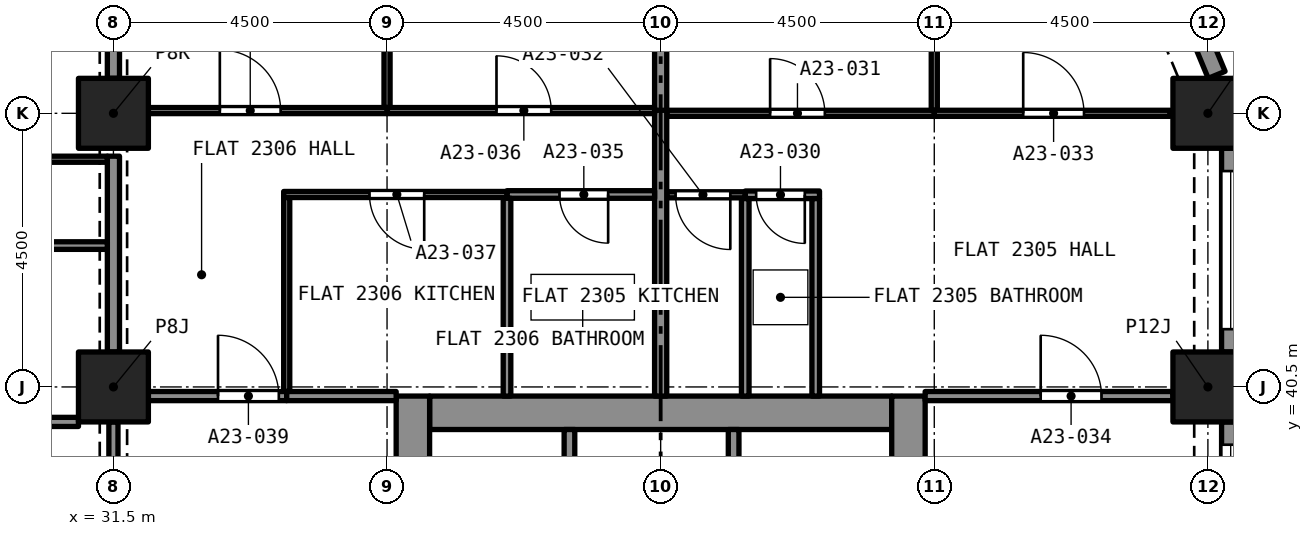
"""IFC4 building model, lengths in metres.
Left out: names, types, materials, properties, quantities, classifications, styles, units other than length and angle.
Written with IfcOpenShell. Run it as: python <this file> out.ifc"""

import sys

from ifc_helpers import new_model, si_unit, direction, frame, frame_2d, origin, origin_2d, place, context, subcontext, project, spatial, rectangle, extrude, element, fill, save


model = new_model("IFC4")
c1 = context("Model", 3, precision=1e-05, world=origin(), true_north=direction((0.0, 1.0)))
c2 = subcontext(c1, "Body", "Model", "MODEL_VIEW")
j1 = project(units=[si_unit("LENGTHUNIT", "METRE"), si_unit("PLANEANGLEUNIT", "RADIAN")], contexts=[c1])
p1 = place(None, origin())
s1 = spatial("IfcSite", under=j1, at=p1, CompositionType="ELEMENT")
p2 = place(p1, origin())
s2 = spatial("IfcBuilding", under=s1, at=p2, CompositionType="ELEMENT")
p3 = place(p2, frame((0.0, 0.0, 86.4)))
s3 = spatial("IfcBuildingStorey", under=s2, at=p3, CompositionType="ELEMENT", Elevation=86.4)
for number, where, z_axis, x_axis in (
    (1, (31.5, 40.5, 0.0), (0.0, 0.0, 1.0), (1.0, 0.0, 0.0)),
    (2, (49.5, 40.5, 0.0), (0.0, 0.0, 1.0), (1.0, 0.0, 0.0)),
    (3, (31.5, 45.0, 0.0), (0.0, 0.0, 1.0), (1.0, 0.0, 0.0)),
    (4, (49.5, 45.0, 0.0), (0.0, 0.0, 1.0), (1.0, 0.0, 0.0)),
):
    element("IfcColumn", number, at=place(p3, frame(where, z_axis=z_axis, x_axis=x_axis)), inside=s3, PredefinedType="COLUMN", context=c2, shape_type="SweptSolid", body=[
        extrude(rectangle(XDim=1.15, YDim=1.15, at=origin_2d()), origin(), (0.0, 0.0, 1.0), 3.2),
    ])
p4 = place(p3, frame((36.7, 40.075, 0.0), z_axis=(0.0, 0.0, 1.0), x_axis=(1.0, 0.0, 0.0)))
e5 = element("IfcWall", 5, at=p4, inside=s3, PredefinedType="SOLIDWALL", context=c2, shape_type="SweptSolid", body=[
    extrude(rectangle(XDim=7.6, YDim=0.55, at=frame_2d((3.8, 0.0))), origin(), (0.0, 0.0, 1.0), 3.2),
])
p5 = place(p3, frame((36.425, 27.15, 0.0), z_axis=(0.0, 0.0, 1.0), x_axis=(0.0, 1.0, 0.0)))
e6 = element("IfcWall", 6, at=p5, inside=s3, PredefinedType="SOLIDWALL", context=c2, shape_type="SweptSolid", body=[
    extrude(rectangle(XDim=13.2, YDim=0.55, at=frame_2d((6.6, 0.0))), origin(), (0.0, 0.0, 1.0), 3.2),
])
p6 = place(p5, frame((8.8, 0.0, 0.0)))
e7 = element("IfcOpeningElement", 7, at=p6, cuts=e6, PredefinedType="OPENING", context=c2, shape_type="SweptSolid", body=[
    extrude(rectangle(XDim=1.2, YDim=2.1, at=frame_2d((0.6, 1.05))), frame((0.0, 0.285, 0.0), z_axis=(0.0, -1.0, 0.0), x_axis=(1.0, 0.0, 0.0)), (0.0, 0.0, 1.0), 0.57),
])
p7 = place(p3, frame((44.575, 27.15, 0.0), z_axis=(0.0, 0.0, 1.0), x_axis=(0.0, 1.0, 0.0)))
e8 = element("IfcWall", 8, at=p7, inside=s3, PredefinedType="SOLIDWALL", context=c2, shape_type="SweptSolid", body=[
    extrude(rectangle(XDim=13.2, YDim=0.55, at=frame_2d((6.6, 0.0))), origin(), (0.0, 0.0, 1.0), 3.2),
])
p8 = place(p7, frame((8.8, 0.0, 0.0)))
e9 = element("IfcOpeningElement", 9, at=p8, cuts=e8, PredefinedType="OPENING", context=c2, shape_type="SweptSolid", body=[
    extrude(rectangle(XDim=1.2, YDim=2.1, at=frame_2d((0.6, 1.05))), frame((0.0, 0.285, 0.0), z_axis=(0.0, -1.0, 0.0), x_axis=(1.0, 0.0, 0.0)), (0.0, 0.0, 1.0), 0.57),
])
p9 = place(p3, frame((49.875, 39.925, 0.0), z_axis=(0.0, 0.0, 1.0), x_axis=(0.0, -1.0, 0.0)))
e10 = element("IfcWall", 10, at=p9, inside=s3, PredefinedType="SOLIDWALL", context=c2, shape_type="SweptSolid", body=[
    extrude(rectangle(XDim=3.35, YDim=0.3, at=frame_2d((1.675, 0.0))), origin(), (0.0, 0.0, 1.0), 3.2),
])
p10 = place(p9, frame((0.375, 0.0, 0.45)))
e11 = element("IfcOpeningElement", 11, at=p10, cuts=e10, PredefinedType="OPENING", context=c2, shape_type="SweptSolid", body=[
    extrude(rectangle(XDim=2.6, YDim=1.95, at=frame_2d((1.3, 0.975))), frame((0.0, 0.16, 0.0), z_axis=(0.0, -1.0, 0.0), x_axis=(1.0, 0.0, 0.0)), (0.0, 0.0, 1.0), 0.32),
])
p11 = place(p3, frame((49.875, 44.425, 0.0), z_axis=(0.0, 0.0, 1.0), x_axis=(0.0, -1.0, 0.0)))
e12 = element("IfcWall", 12, at=p11, inside=s3, PredefinedType="SOLIDWALL", context=c2, shape_type="SweptSolid", body=[
    extrude(rectangle(XDim=3.35, YDim=0.3, at=frame_2d((1.675, 0.0))), origin(), (0.0, 0.0, 1.0), 3.2),
])
p12 = place(p11, frame((0.375, 0.0, 0.45)))
e13 = element("IfcOpeningElement", 13, at=p12, cuts=e12, PredefinedType="OPENING", context=c2, shape_type="SweptSolid", body=[
    extrude(rectangle(XDim=2.6, YDim=1.95, at=frame_2d((1.3, 0.975))), frame((0.0, 0.16, 0.0), z_axis=(0.0, -1.0, 0.0), x_axis=(1.0, 0.0, 0.0)), (0.0, 0.0, 1.0), 0.32),
])
p13 = place(p3, frame((48.816, 47.631, 0.0), z_axis=(0.0, 0.0, 1.0), x_axis=(0.382723818695, -0.923862802911, 0.0)))
e14 = element("IfcWall", 14, at=p13, inside=s3, PredefinedType="SOLIDWALL", context=c2, shape_type="SweptSolid", body=[
    extrude(rectangle(XDim=2.164, YDim=0.3, at=frame_2d((1.082, 0.0))), origin(), (0.0, 0.0, 1.0), 3.2),
])
p14 = place(p13, frame((0.271, 0.0, 0.45)))
e15 = element("IfcOpeningElement", 15, at=p14, cuts=e14, PredefinedType="OPENING", context=c2, shape_type="SweptSolid", body=[
    extrude(rectangle(XDim=1.4, YDim=1.95, at=frame_2d((0.7, 0.975))), frame((0.0, 0.16, 0.0), z_axis=(0.0, -1.0, 0.0), x_axis=(1.0, 0.0, 0.0)), (0.0, 0.0, 1.0), 0.32),
])
p15 = place(p3, frame((43.113, 43.66, 0.0), z_axis=(0.0, 0.0, 1.0), x_axis=(-1.0, 0.0, 0.0)))
e16 = element("IfcWall", 16, at=p15, inside=s3, PredefinedType="PARTITIONING", context=c2, shape_type="SweptSolid", body=[
    extrude(rectangle(XDim=1.222, YDim=0.125, at=frame_2d((0.611, 0.0))), origin(), (0.0, 0.0, 1.0), 2.9),
])
p16 = place(p15, frame((0.242, 0.0, 0.0)))
e17 = element("IfcOpeningElement", 17, at=p16, cuts=e16, PredefinedType="OPENING", context=c2, shape_type="SweptSolid", body=[
    extrude(rectangle(XDim=0.8, YDim=2.1, at=frame_2d((0.4, 1.05))), frame((0.0, 0.073, 0.0), z_axis=(0.0, -1.0, 0.0), x_axis=(1.0, 0.0, 0.0)), (0.0, 0.0, 1.0), 0.145),
])
for number, where, z_axis, x_axis in (
    (18, (43.05, 40.35, 0.0), (0.0, 0.0, 1.0), (0.0, 1.0, 0.0)),
    (19, (41.891, 40.35, 0.0), (0.0, 0.0, 1.0), (0.0, 1.0, 0.0)),
):
    element("IfcWall", number, at=place(p3, frame(where, z_axis=z_axis, x_axis=x_axis)), inside=s3, PredefinedType="PARTITIONING", context=c2, shape_type="SweptSolid", body=[
        extrude(rectangle(XDim=3.247, YDim=0.125, at=frame_2d((1.624, 0.0))), origin(), (0.0, 0.0, 1.0), 2.9),
    ])
p17 = place(p3, frame((40.6, 45.0, 0.0), z_axis=(0.0, 0.0, 1.0), x_axis=(1.0, 0.0, 0.0)))
e20 = element("IfcWall", 20, at=p17, inside=s3, PredefinedType="PARTITIONING", context=c2, shape_type="SweptSolid", body=[
    extrude(rectangle(XDim=4.4, YDim=0.1, at=frame_2d((2.2, 0.0))), origin(), (0.0, 0.0, 1.0), 2.9),
])
p18 = place(p17, frame((1.7, 0.0, 0.0)))
e21 = element("IfcOpeningElement", 21, at=p18, cuts=e20, PredefinedType="OPENING", context=c2, shape_type="SweptSolid", body=[
    extrude(rectangle(XDim=0.9, YDim=2.1, at=frame_2d((0.45, 1.05))), frame((0.0, 0.06, 0.0), z_axis=(0.0, -1.0, 0.0), x_axis=(1.0, 0.0, 0.0)), (0.0, 0.0, 1.0), 0.12),
])
p19 = place(p3, frame((45.0, 45.05, 0.0), z_axis=(0.0, 0.0, 1.0), x_axis=(0.0, 1.0, 0.0)))
e22 = element("IfcWall", 22, at=p19, inside=s3, PredefinedType="PARTITIONING", context=c2, shape_type="SweptSolid", body=[
    extrude(rectangle(XDim=3.828, YDim=0.1, at=frame_2d((1.914, 0.0))), origin(), (0.0, 0.0, 1.0), 2.9),
])
p20 = place(p3, frame((40.5, 44.995, 0.0), z_axis=(0.0, 0.0, 1.0), x_axis=(0.0, 1.0, 0.0)))
e23 = element("IfcWall", 23, at=p20, inside=s3, PredefinedType="PARTITIONING", context=c2, shape_type="SweptSolid", body=[
    extrude(rectangle(XDim=3.93, YDim=0.2, at=frame_2d((1.965, 0.0))), origin(), (0.0, 0.0, 1.0), 2.9),
])
p21 = place(p3, frame((41.891, 43.66, 0.0), z_axis=(0.0, 0.0, 1.0), x_axis=(-1.0, 0.0, 0.0)))
e24 = element("IfcWall", 24, at=p21, inside=s3, PredefinedType="PARTITIONING", context=c2, shape_type="SweptSolid", body=[
    extrude(rectangle(XDim=1.291, YDim=0.1, at=frame_2d((0.646, 0.0))), origin(), (0.0, 0.0, 1.0), 2.9),
])
p22 = place(p21, frame((0.246, 0.0, 0.0)))
e25 = element("IfcOpeningElement", 25, at=p22, cuts=e24, PredefinedType="OPENING", context=c2, shape_type="SweptSolid", body=[
    extrude(rectangle(XDim=0.9, YDim=2.1, at=frame_2d((0.45, 1.05))), frame((0.0, 0.06, 0.0), z_axis=(0.0, -1.0, 0.0), x_axis=(1.0, 0.0, 0.0)), (0.0, 0.0, 1.0), 0.12),
])
p23 = place(p3, frame((45.0, 45.0, 0.0), z_axis=(0.0, 0.0, 1.0), x_axis=(1.0, 0.0, 0.0)))
e26 = element("IfcWall", 26, at=p23, inside=s3, PredefinedType="PARTITIONING", context=c2, shape_type="SweptSolid", body=[
    extrude(rectangle(XDim=3.878, YDim=0.1, at=frame_2d((1.939, 0.0))), origin(), (0.0, 0.0, 1.0), 2.9),
])
p24 = place(p23, frame((1.462, 0.0, 0.0)))
e27 = element("IfcOpeningElement", 27, at=p24, cuts=e26, PredefinedType="OPENING", context=c2, shape_type="SweptSolid", body=[
    extrude(rectangle(XDim=1.0, YDim=2.1, at=frame_2d((0.5, 1.05))), frame((0.0, 0.06, 0.0), z_axis=(0.0, -1.0, 0.0), x_axis=(1.0, 0.0, 0.0)), (0.0, 0.0, 1.0), 0.12),
])
p25 = place(p3, frame((44.85, 40.35, 0.0), z_axis=(0.0, 0.0, 1.0), x_axis=(1.0, 0.0, 0.0)))
e28 = element("IfcWall", 28, at=p25, inside=s3, PredefinedType="PARTITIONING", context=c2, shape_type="SweptSolid", body=[
    extrude(rectangle(XDim=4.075, YDim=0.15, at=frame_2d((2.038, 0.0))), origin(), (0.0, 0.0, 1.0), 2.9),
])
p26 = place(p25, frame((1.9, 0.0, 0.0)))
e29 = element("IfcOpeningElement", 29, at=p26, cuts=e28, PredefinedType="OPENING", context=c2, shape_type="SweptSolid", body=[
    extrude(rectangle(XDim=1.0, YDim=2.1, at=frame_2d((0.5, 1.05))), frame((0.0, 0.085, 0.0), z_axis=(0.0, -1.0, 0.0), x_axis=(1.0, 0.0, 0.0)), (0.0, 0.0, 1.0), 0.17),
])
p27 = place(p3, frame((40.5, 40.35, 0.0), z_axis=(0.0, 0.0, 1.0), x_axis=(0.0, 1.0, 0.0)))
e30 = element("IfcWall", 30, at=p27, inside=s3, PredefinedType="PARTITIONING", context=c2, shape_type="SweptSolid", body=[
    extrude(rectangle(XDim=4.7, YDim=0.2, at=frame_2d((2.35, 0.0))), origin(), (0.0, 0.0, 1.0), 2.9),
])
p28 = place(p3, frame((40.4, 43.665, 0.0), z_axis=(0.0, 0.0, 1.0), x_axis=(-1.0, 0.0, 0.0)))
e31 = element("IfcWall", 31, at=p28, inside=s3, PredefinedType="PARTITIONING", context=c2, shape_type="SweptSolid", body=[
    extrude(rectangle(XDim=2.427, YDim=0.125, at=frame_2d((1.214, 0.0))), origin(), (0.0, 0.0, 1.0), 2.9),
])
p29 = place(p28, frame((0.764, 0.0, 0.0)))
e32 = element("IfcOpeningElement", 32, at=p29, cuts=e31, PredefinedType="OPENING", context=c2, shape_type="SweptSolid", body=[
    extrude(rectangle(XDim=0.8, YDim=2.1, at=frame_2d((0.4, 1.05))), frame((0.0, 0.073, 0.0), z_axis=(0.0, -1.0, 0.0), x_axis=(1.0, 0.0, 0.0)), (0.0, 0.0, 1.0), 0.145),
])
p30 = place(p3, frame((37.973, 40.35, 0.0), z_axis=(0.0, 0.0, 1.0), x_axis=(0.0, 1.0, 0.0)))
e33 = element("IfcWall", 33, at=p30, inside=s3, PredefinedType="PARTITIONING", context=c2, shape_type="SweptSolid", body=[
    extrude(rectangle(XDim=3.252, YDim=0.125, at=frame_2d((1.626, 0.0))), origin(), (0.0, 0.0, 1.0), 2.9),
])
p31 = place(p3, frame((36.0, 45.045, 0.0), z_axis=(0.0, 0.0, 1.0), x_axis=(1.0, 0.0, 0.0)))
e34 = element("IfcWall", 34, at=p31, inside=s3, PredefinedType="PARTITIONING", context=c2, shape_type="SweptSolid", body=[
    extrude(rectangle(XDim=4.4, YDim=0.1, at=frame_2d((2.2, 0.0))), origin(), (0.0, 0.0, 1.0), 2.9),
])
p32 = place(p31, frame((1.8, 0.0, 0.0)))
e35 = element("IfcOpeningElement", 35, at=p32, cuts=e34, PredefinedType="OPENING", context=c2, shape_type="SweptSolid", body=[
    extrude(rectangle(XDim=0.9, YDim=2.1, at=frame_2d((0.45, 1.05))), frame((0.0, 0.06, 0.0), z_axis=(0.0, -1.0, 0.0), x_axis=(1.0, 0.0, 0.0)), (0.0, 0.0, 1.0), 0.12),
])
p33 = place(p3, frame((36.0, 45.095, 0.0), z_axis=(0.0, 0.0, 1.0), x_axis=(0.0, 1.0, 0.0)))
e36 = element("IfcWall", 36, at=p33, inside=s3, PredefinedType="PARTITIONING", context=c2, shape_type="SweptSolid", body=[
    extrude(rectangle(XDim=3.83, YDim=0.1, at=frame_2d((1.915, 0.0))), origin(), (0.0, 0.0, 1.0), 2.9),
])
p34 = place(p3, frame((37.973, 43.665, 0.0), z_axis=(0.0, 0.0, 1.0), x_axis=(-1.0, 0.0, 0.0)))
e37 = element("IfcWall", 37, at=p34, inside=s3, PredefinedType="PARTITIONING", context=c2, shape_type="SweptSolid", body=[
    extrude(rectangle(XDim=3.673, YDim=0.1, at=frame_2d((1.836, 0.0))), origin(), (0.0, 0.0, 1.0), 2.9),
])
p35 = place(p34, frame((1.361, 0.0, 0.0)))
e38 = element("IfcOpeningElement", 38, at=p35, cuts=e37, PredefinedType="OPENING", context=c2, shape_type="SweptSolid", body=[
    extrude(rectangle(XDim=0.9, YDim=2.1, at=frame_2d((0.45, 1.05))), frame((0.0, 0.06, 0.0), z_axis=(0.0, -1.0, 0.0), x_axis=(1.0, 0.0, 0.0)), (0.0, 0.0, 1.0), 0.12),
])
p36 = place(p3, frame((34.35, 40.425, 0.0), z_axis=(0.0, 0.0, 1.0), x_axis=(0.0, 1.0, 0.0)))
e39 = element("IfcWall", 39, at=p36, inside=s3, PredefinedType="PARTITIONING", context=c2, shape_type="SweptSolid", body=[
    extrude(rectangle(XDim=3.19, YDim=0.1, at=frame_2d((1.595, 0.0))), origin(), (0.0, 0.0, 1.0), 2.9),
])
p37 = place(p3, frame((32.075, 45.045, 0.0), z_axis=(0.0, 0.0, 1.0), x_axis=(1.0, 0.0, 0.0)))
e40 = element("IfcWall", 40, at=p37, inside=s3, PredefinedType="PARTITIONING", context=c2, shape_type="SweptSolid", body=[
    extrude(rectangle(XDim=3.925, YDim=0.1, at=frame_2d((1.962, 0.0))), origin(), (0.0, 0.0, 1.0), 2.9),
])
p38 = place(p37, frame((1.175, 0.0, 0.0)))
e41 = element("IfcOpeningElement", 41, at=p38, cuts=e40, PredefinedType="OPENING", context=c2, shape_type="SweptSolid", body=[
    extrude(rectangle(XDim=1.0, YDim=2.1, at=frame_2d((0.5, 1.05))), frame((0.0, 0.06, 0.0), z_axis=(0.0, -1.0, 0.0), x_axis=(1.0, 0.0, 0.0)), (0.0, 0.0, 1.0), 0.12),
])
p39 = place(p3, frame((31.5, 41.075, 0.0), z_axis=(0.0, 0.0, 1.0), x_axis=(0.0, 1.0, 0.0)))
e42 = element("IfcWall", 42, at=p39, inside=s3, PredefinedType="PARTITIONING", context=c2, shape_type="SweptSolid", body=[
    extrude(rectangle(XDim=3.22, YDim=0.2, at=frame_2d((1.61, 0.0))), origin(), (0.0, 0.0, 1.0), 2.38),
])
p40 = place(p3, frame((32.075, 40.35, 0.0), z_axis=(0.0, 0.0, 1.0), x_axis=(1.0, 0.0, 0.0)))
e43 = element("IfcWall", 43, at=p40, inside=s3, PredefinedType="PARTITIONING", context=c2, shape_type="SweptSolid", body=[
    extrude(rectangle(XDim=2.275, YDim=0.15, at=frame_2d((1.138, 0.0))), origin(), (0.0, 0.0, 1.0), 2.9),
])
p41 = place(p40, frame((1.145, 0.0, 0.0)))
e44 = element("IfcOpeningElement", 44, at=p41, cuts=e43, PredefinedType="OPENING", context=c2, shape_type="SweptSolid", body=[
    extrude(rectangle(XDim=1.0, YDim=2.1, at=frame_2d((0.5, 1.05))), frame((0.0, 0.085, 0.0), z_axis=(0.0, -1.0, 0.0), x_axis=(1.0, 0.0, 0.0)), (0.0, 0.0, 1.0), 0.17),
])
p42 = place(p3, frame((34.35, 40.35, 0.0), z_axis=(0.0, 0.0, 1.0), x_axis=(1.0, 0.0, 0.0)))
e45 = element("IfcWall", 45, at=p42, inside=s3, PredefinedType="PARTITIONING", context=c2, shape_type="SweptSolid", body=[
    extrude(rectangle(XDim=1.8, YDim=0.15, at=frame_2d((0.9, 0.0))), origin(), (0.0, 0.0, 1.0), 2.9),
])
p43 = place(p3, frame((31.5, 45.575, 0.0), z_axis=(0.0, 0.0, 1.0), x_axis=(0.0, 1.0, 0.0)))
e46 = element("IfcWall", 46, at=p43, inside=s3, PredefinedType="PARTITIONING", context=c2, shape_type="SweptSolid", body=[
    extrude(rectangle(XDim=3.35, YDim=0.2, at=frame_2d((1.675, 0.0))), origin(), (0.0, 0.0, 1.0), 2.38),
])
p44 = place(p3, frame((31.4, 42.825, 0.0), z_axis=(0.0, 0.0, 1.0), x_axis=(-1.0, 0.0, 0.0)))
e47 = element("IfcWall", 47, at=p44, inside=s3, PredefinedType="PARTITIONING", context=c2, shape_type="SweptSolid", body=[
    extrude(rectangle(XDim=6.112, YDim=0.125, at=frame_2d((3.056, 0.0))), origin(), (0.0, 0.0, 1.0), 2.75),
])
p45 = place(p44, frame((2.575, 0.0, 0.0)))
e48 = element("IfcOpeningElement", 48, at=p45, cuts=e47, PredefinedType="OPENING", context=c2, shape_type="SweptSolid", body=[
    extrude(rectangle(XDim=0.8, YDim=2.1, at=frame_2d((0.4, 1.05))), frame((0.0, 0.073, 0.0), z_axis=(0.0, -1.0, 0.0), x_axis=(1.0, 0.0, 0.0)), (0.0, 0.0, 1.0), 0.145),
])
p46 = place(p3, frame((25.35, 39.925, 0.0), z_axis=(0.0, 0.0, 1.0), x_axis=(1.0, 0.0, 0.0)))
e49 = element("IfcWall", 49, at=p46, inside=s3, PredefinedType="PARTITIONING", context=c2, shape_type="SweptSolid", body=[
    extrude(rectangle(XDim=5.575, YDim=0.15, at=frame_2d((2.788, 0.0))), origin(), (0.0, 0.0, 1.0), 2.75),
])
p47 = place(p3, frame((27.0, 44.245, 0.0), z_axis=(0.0, 0.0, 1.0), x_axis=(1.0, 0.0, 0.0)))
e50 = element("IfcWall", 50, at=p47, inside=s3, PredefinedType="PARTITIONING", context=c2, shape_type="SweptSolid", body=[
    extrude(rectangle(XDim=4.4, YDim=0.1, at=frame_2d((2.2, 0.0))), origin(), (0.0, 0.0, 1.0), 2.75),
])
p48 = place(p47, frame((1.8, 0.0, 0.0)))
e51 = element("IfcOpeningElement", 51, at=p48, cuts=e50, PredefinedType="OPENING", context=c2, shape_type="SweptSolid", body=[
    extrude(rectangle(XDim=0.9, YDim=2.1, at=frame_2d((0.45, 1.05))), frame((0.0, 0.06, 0.0), z_axis=(0.0, -1.0, 0.0), x_axis=(1.0, 0.0, 0.0)), (0.0, 0.0, 1.0), 0.12),
])
p49 = place(p3, frame((31.5, 36.575, 0.0), z_axis=(0.0, 0.0, 1.0), x_axis=(0.0, 1.0, 0.0)))
e52 = element("IfcWall", 52, at=p49, inside=s3, PredefinedType="PARTITIONING", context=c2, shape_type="SweptSolid", body=[
    extrude(rectangle(XDim=3.35, YDim=0.15, at=frame_2d((1.675, 0.0))), origin(), (0.0, 0.0, 1.0), 2.38),
])
p50 = place(p49, frame((1.075, 0.0, 0.0)))
e53 = element("IfcOpeningElement", 53, at=p50, cuts=e52, PredefinedType="OPENING", context=c2, shape_type="SweptSolid", body=[
    extrude(rectangle(XDim=1.2, YDim=2.1, at=frame_2d((0.6, 1.05))), frame((0.0, 0.085, 0.0), z_axis=(0.0, -1.0, 0.0), x_axis=(1.0, 0.0, 0.0)), (0.0, 0.0, 1.0), 0.17),
])
for number, where, z_axis, x_axis in (
    (54, (41.7, 37.5, 0.0), (0.0, 0.0, 1.0), (0.0, 1.0, 0.0)),
    (55, (39.0, 37.5, 0.0), (0.0, 0.0, 1.0), (0.0, 1.0, 0.0)),
):
    element("IfcWall", number, at=place(p3, frame(where, z_axis=z_axis, x_axis=x_axis)), inside=s3, PredefinedType="SOLIDWALL", context=c2, shape_type="SweptSolid", body=[
        extrude(rectangle(XDim=2.3, YDim=0.175, at=frame_2d((1.15, 0.0))), origin(), (0.0, 0.0, 1.0), 2.9),
    ])
p51 = place(p10, origin())
e56 = element("IfcWindow", 56, at=p51, inside=s3, PartitioningType="SINGLE_PANEL", PredefinedType="WINDOW", context=c2, shape_type="SweptSolid", body=[
    extrude(rectangle(XDim=2.6, YDim=1.95, at=frame_2d((1.3, 0.975))), frame((0.0, 0.03, 0.0), z_axis=(0.0, -1.0, 0.0), x_axis=(1.0, 0.0, 0.0)), (0.0, 0.0, 1.0), 0.06),
])
fill(e11, e56)
p52 = place(p12, origin())
e57 = element("IfcWindow", 57, at=p52, inside=s3, PartitioningType="SINGLE_PANEL", PredefinedType="WINDOW", context=c2, shape_type="SweptSolid", body=[
    extrude(rectangle(XDim=2.6, YDim=1.95, at=frame_2d((1.3, 0.975))), frame((0.0, 0.03, 0.0), z_axis=(0.0, -1.0, 0.0), x_axis=(1.0, 0.0, 0.0)), (0.0, 0.0, 1.0), 0.06),
])
fill(e13, e57)
p53 = place(p16, origin())
e58 = element("IfcDoor", 58, at=p53, inside=s3, OperationType="SINGLE_SWING_RIGHT", PredefinedType="DOOR", context=c2, shape_type="SweptSolid", body=[
    extrude(rectangle(XDim=0.8, YDim=2.1, at=frame_2d((0.4, 1.05))), frame((0.0, 0.025, 0.0), z_axis=(0.0, -1.0, 0.0), x_axis=(1.0, 0.0, 0.0)), (0.0, 0.0, 1.0), 0.05),
])
fill(e17, e58)
p54 = place(p18, origin())
e59 = element("IfcDoor", 59, at=p54, inside=s3, OperationType="SINGLE_SWING_LEFT", PredefinedType="DOOR", context=c2, shape_type="SweptSolid", body=[
    extrude(rectangle(XDim=0.9, YDim=2.1, at=frame_2d((0.45, 1.05))), frame((0.0, 0.025, 0.0), z_axis=(0.0, -1.0, 0.0), x_axis=(1.0, 0.0, 0.0)), (0.0, 0.0, 1.0), 0.05),
])
fill(e21, e59)
p55 = place(p22, origin())
e60 = element("IfcDoor", 60, at=p55, inside=s3, OperationType="SINGLE_SWING_RIGHT", PredefinedType="DOOR", context=c2, shape_type="SweptSolid", body=[
    extrude(rectangle(XDim=0.9, YDim=2.1, at=frame_2d((0.45, 1.05))), frame((0.0, 0.025, 0.0), z_axis=(0.0, -1.0, 0.0), x_axis=(1.0, 0.0, 0.0)), (0.0, 0.0, 1.0), 0.05),
])
fill(e25, e60)
p56 = place(p24, origin())
e61 = element("IfcDoor", 61, at=p56, inside=s3, OperationType="SINGLE_SWING_RIGHT", PredefinedType="DOOR", context=c2, shape_type="SweptSolid", body=[
    extrude(rectangle(XDim=1.0, YDim=2.1, at=frame_2d((0.5, 1.05))), frame((0.0, 0.025, 0.0), z_axis=(0.0, -1.0, 0.0), x_axis=(1.0, 0.0, 0.0)), (0.0, 0.0, 1.0), 0.05),
])
fill(e27, e61)
p57 = place(p26, origin())
e62 = element("IfcDoor", 62, at=p57, inside=s3, OperationType="SINGLE_SWING_RIGHT", PredefinedType="DOOR", context=c2, shape_type="SweptSolid", body=[
    extrude(rectangle(XDim=1.0, YDim=2.1, at=frame_2d((0.5, 1.05))), frame((0.0, 0.025, 0.0), z_axis=(0.0, -1.0, 0.0), x_axis=(1.0, 0.0, 0.0)), (0.0, 0.0, 1.0), 0.05),
])
fill(e29, e62)
p58 = place(p29, origin())
e63 = element("IfcDoor", 63, at=p58, inside=s3, OperationType="SINGLE_SWING_LEFT", PredefinedType="DOOR", context=c2, shape_type="SweptSolid", body=[
    extrude(rectangle(XDim=0.8, YDim=2.1, at=frame_2d((0.4, 1.05))), frame((0.0, 0.025, 0.0), z_axis=(0.0, -1.0, 0.0), x_axis=(1.0, 0.0, 0.0)), (0.0, 0.0, 1.0), 0.05),
])
fill(e32, e63)
p59 = place(p32, origin())
e64 = element("IfcDoor", 64, at=p59, inside=s3, OperationType="SINGLE_SWING_RIGHT", PredefinedType="DOOR", context=c2, shape_type="SweptSolid", body=[
    extrude(rectangle(XDim=0.9, YDim=2.1, at=frame_2d((0.45, 1.05))), frame((0.0, 0.025, 0.0), z_axis=(0.0, -1.0, 0.0), x_axis=(1.0, 0.0, 0.0)), (0.0, 0.0, 1.0), 0.05),
])
fill(e35, e64)
p60 = place(p35, origin())
e65 = element("IfcDoor", 65, at=p60, inside=s3, OperationType="SINGLE_SWING_LEFT", PredefinedType="DOOR", context=c2, shape_type="SweptSolid", body=[
    extrude(rectangle(XDim=0.9, YDim=2.1, at=frame_2d((0.45, 1.05))), frame((0.0, 0.025, 0.0), z_axis=(0.0, -1.0, 0.0), x_axis=(1.0, 0.0, 0.0)), (0.0, 0.0, 1.0), 0.05),
])
fill(e38, e65)
p61 = place(p38, origin())
e66 = element("IfcDoor", 66, at=p61, inside=s3, OperationType="SINGLE_SWING_LEFT", PredefinedType="DOOR", context=c2, shape_type="SweptSolid", body=[
    extrude(rectangle(XDim=1.0, YDim=2.1, at=frame_2d((0.5, 1.05))), frame((0.0, 0.025, 0.0), z_axis=(0.0, -1.0, 0.0), x_axis=(1.0, 0.0, 0.0)), (0.0, 0.0, 1.0), 0.05),
])
fill(e41, e66)
p62 = place(p41, origin())
e67 = element("IfcDoor", 67, at=p62, inside=s3, OperationType="SINGLE_SWING_RIGHT", PredefinedType="DOOR", context=c2, shape_type="SweptSolid", body=[
    extrude(rectangle(XDim=1.0, YDim=2.1, at=frame_2d((0.5, 1.05))), frame((0.0, 0.025, 0.0), z_axis=(0.0, -1.0, 0.0), x_axis=(1.0, 0.0, 0.0)), (0.0, 0.0, 1.0), 0.05),
])
fill(e44, e67)
save(model, sys.argv[1])
